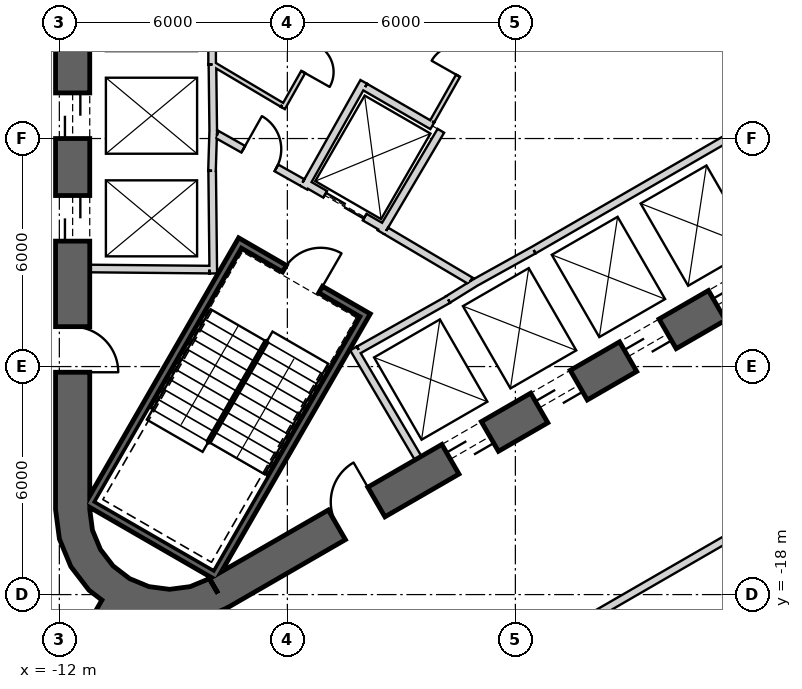
"""IFC4 building model, lengths in metres.
Left out: names, types, materials, properties, quantities, classifications, styles, units other than length and angle.
Written with IfcOpenShell. Run it as: python <this file> out.ifc"""

import sys

from ifc_helpers import new_model, si_unit, direction, frame, frame_2d, origin, place, context, subcontext, project, spatial, polyline, rectangle, outline, extrude, element, fill, save


model = new_model("IFC4")
c1 = context("Model", 3, precision=1e-05, world=origin(), true_north=direction((0.0, 1.0)))
c2 = subcontext(c1, "Body", "Model", "MODEL_VIEW")
j1 = project(units=[si_unit("LENGTHUNIT", "METRE"), si_unit("PLANEANGLEUNIT", "RADIAN")], contexts=[c1])
p1 = place(None, origin())
s1 = spatial("IfcSite", under=j1, at=p1, CompositionType="ELEMENT")
p2 = place(p1, origin())
s2 = spatial("IfcBuilding", under=s1, at=p2, CompositionType="ELEMENT")
p3 = place(p2, frame((0.0, 0.0, 193.2)))
s3 = spatial("IfcBuildingStorey", under=s2, at=p3, CompositionType="ELEMENT", Elevation=193.2)
p4 = place(p3, frame((-11.65, 15.762, 0.0), z_axis=(0.0, 0.0, 1.0), x_axis=(0.0, -1.0, 0.0)))
e1 = element("IfcWall", 1, at=p4, inside=s3, PredefinedType="SHEAR", context=c2, shape_type="SweptSolid", body=[
    extrude(rectangle(XDim=31.523, YDim=0.9, at=frame_2d((15.762, 0.0))), origin(), (0.0, 0.0, 1.0), 4.0),
])
p5 = place(p4, frame((7.062, 0.0, 0.0)))
e2 = element("IfcOpeningElement", 2, at=p5, cuts=e1, PredefinedType="OPENING", context=c2, shape_type="SweptSolid", body=[
    extrude(rectangle(XDim=1.2, YDim=2.4, at=frame_2d((0.6, 1.2))), frame((0.0, 0.46, 0.0), z_axis=(0.0, -1.0, 0.0), x_axis=(1.0, 0.0, 0.0)), (0.0, 0.0, 1.0), 0.92),
])
p6 = place(p4, frame((9.762, 0.0, 0.0)))
e3 = element("IfcOpeningElement", 3, at=p6, cuts=e1, PredefinedType="OPENING", context=c2, shape_type="SweptSolid", body=[
    extrude(rectangle(XDim=1.2, YDim=2.4, at=frame_2d((0.6, 1.2))), frame((0.0, 0.46, 0.0), z_axis=(0.0, -1.0, 0.0), x_axis=(1.0, 0.0, 0.0)), (0.0, 0.0, 1.0), 0.92),
])
p7 = place(p4, frame((12.462, 0.0, 0.0)))
e4 = element("IfcOpeningElement", 4, at=p7, cuts=e1, PredefinedType="OPENING", context=c2, shape_type="SweptSolid", body=[
    extrude(rectangle(XDim=1.2, YDim=2.4, at=frame_2d((0.6, 1.2))), frame((0.0, 0.46, 0.0), z_axis=(0.0, -1.0, 0.0), x_axis=(1.0, 0.0, 0.0)), (0.0, 0.0, 1.0), 0.92),
])
p8 = place(p4, frame((15.162, 0.0, 0.0)))
e5 = element("IfcOpeningElement", 5, at=p8, cuts=e1, PredefinedType="OPENING", context=c2, shape_type="SweptSolid", body=[
    extrude(rectangle(XDim=1.2, YDim=2.4, at=frame_2d((0.6, 1.2))), frame((0.0, 0.46, 0.0), z_axis=(0.0, -1.0, 0.0), x_axis=(1.0, 0.0, 0.0)), (0.0, 0.0, 1.0), 0.92),
])
p9 = place(p4, frame((17.862, 0.0, 0.0)))
e6 = element("IfcOpeningElement", 6, at=p9, cuts=e1, PredefinedType="OPENING", context=c2, shape_type="SweptSolid", body=[
    extrude(rectangle(XDim=1.2, YDim=2.4, at=frame_2d((0.6, 1.2))), frame((0.0, 0.46, 0.0), z_axis=(0.0, -1.0, 0.0), x_axis=(1.0, 0.0, 0.0)), (0.0, 0.0, 1.0), 0.92),
])
p10 = place(p4, frame((20.562, 0.0, 0.0)))
e7 = element("IfcOpeningElement", 7, at=p10, cuts=e1, PredefinedType="OPENING", context=c2, shape_type="SweptSolid", body=[
    extrude(rectangle(XDim=1.2, YDim=2.4, at=frame_2d((0.6, 1.2))), frame((0.0, 0.46, 0.0), z_axis=(0.0, -1.0, 0.0), x_axis=(1.0, 0.0, 0.0)), (0.0, 0.0, 1.0), 0.92),
])
p11 = place(p4, frame((23.262, 0.0, 0.0)))
e8 = element("IfcOpeningElement", 8, at=p11, cuts=e1, PredefinedType="OPENING", context=c2, shape_type="SweptSolid", body=[
    extrude(rectangle(XDim=1.2, YDim=2.4, at=frame_2d((0.6, 1.2))), frame((0.0, 0.46, 0.0), z_axis=(0.0, -1.0, 0.0), x_axis=(1.0, 0.0, 0.0)), (0.0, 0.0, 1.0), 0.92),
])
p12 = place(p4, frame((3.612, 0.0, 0.0)))
e9 = element("IfcOpeningElement", 9, at=p12, cuts=e1, PredefinedType="OPENING", context=c2, shape_type="SweptSolid", body=[
    extrude(rectangle(XDim=1.2, YDim=2.4, at=frame_2d((0.6, 1.2))), frame((0.0, 0.46, 0.0), z_axis=(0.0, -1.0, 0.0), x_axis=(1.0, 0.0, 0.0)), (0.0, 0.0, 1.0), 0.92),
])
p13 = place(p4, frame((26.712, 0.0, 0.0)))
e10 = element("IfcOpeningElement", 10, at=p13, cuts=e1, PredefinedType="OPENING", context=c2, shape_type="SweptSolid", body=[
    extrude(rectangle(XDim=1.2, YDim=2.4, at=frame_2d((0.6, 1.2))), frame((0.0, 0.46, 0.0), z_axis=(0.0, -1.0, 0.0), x_axis=(1.0, 0.0, 0.0)), (0.0, 0.0, 1.0), 0.92),
])
p14 = place(p3, frame((-7.825, -17.97, 0.0), z_axis=(0.0, 0.0, 1.0), x_axis=(0.866028369851, 0.499994862586, 0.0)))
e11 = element("IfcWall", 11, at=p14, inside=s3, PredefinedType="SHEAR", context=c2, shape_type="SweptSolid", body=[
    extrude(rectangle(XDim=31.523, YDim=0.9, at=frame_2d((15.762, 0.0))), origin(), (0.0, 0.0, 1.0), 4.0),
])
p15 = place(p14, frame((7.062, 0.0, 0.0)))
e12 = element("IfcOpeningElement", 12, at=p15, cuts=e11, PredefinedType="OPENING", context=c2, shape_type="SweptSolid", body=[
    extrude(rectangle(XDim=1.2, YDim=2.4, at=frame_2d((0.6, 1.2))), frame((0.0, 0.46, 0.0), z_axis=(0.0, -1.0, 0.0), x_axis=(1.0, 0.0, 0.0)), (0.0, 0.0, 1.0), 0.92),
])
p16 = place(p14, frame((9.762, 0.0, 0.0)))
e13 = element("IfcOpeningElement", 13, at=p16, cuts=e11, PredefinedType="OPENING", context=c2, shape_type="SweptSolid", body=[
    extrude(rectangle(XDim=1.2, YDim=2.4, at=frame_2d((0.6, 1.2))), frame((0.0, 0.46, 0.0), z_axis=(0.0, -1.0, 0.0), x_axis=(1.0, 0.0, 0.0)), (0.0, 0.0, 1.0), 0.92),
])
p17 = place(p14, frame((12.462, 0.0, 0.0)))
e14 = element("IfcOpeningElement", 14, at=p17, cuts=e11, PredefinedType="OPENING", context=c2, shape_type="SweptSolid", body=[
    extrude(rectangle(XDim=1.2, YDim=2.4, at=frame_2d((0.6, 1.2))), frame((0.0, 0.46, 0.0), z_axis=(0.0, -1.0, 0.0), x_axis=(1.0, 0.0, 0.0)), (0.0, 0.0, 1.0), 0.92),
])
p18 = place(p14, frame((15.162, 0.0, 0.0)))
e15 = element("IfcOpeningElement", 15, at=p18, cuts=e11, PredefinedType="OPENING", context=c2, shape_type="SweptSolid", body=[
    extrude(rectangle(XDim=1.2, YDim=2.4, at=frame_2d((0.6, 1.2))), frame((0.0, 0.46, 0.0), z_axis=(0.0, -1.0, 0.0), x_axis=(1.0, 0.0, 0.0)), (0.0, 0.0, 1.0), 0.92),
])
p19 = place(p14, frame((17.862, 0.0, 0.0)))
e16 = element("IfcOpeningElement", 16, at=p19, cuts=e11, PredefinedType="OPENING", context=c2, shape_type="SweptSolid", body=[
    extrude(rectangle(XDim=1.2, YDim=2.4, at=frame_2d((0.6, 1.2))), frame((0.0, 0.46, 0.0), z_axis=(0.0, -1.0, 0.0), x_axis=(1.0, 0.0, 0.0)), (0.0, 0.0, 1.0), 0.92),
])
p20 = place(p14, frame((20.562, 0.0, 0.0)))
e17 = element("IfcOpeningElement", 17, at=p20, cuts=e11, PredefinedType="OPENING", context=c2, shape_type="SweptSolid", body=[
    extrude(rectangle(XDim=1.2, YDim=2.4, at=frame_2d((0.6, 1.2))), frame((0.0, 0.46, 0.0), z_axis=(0.0, -1.0, 0.0), x_axis=(1.0, 0.0, 0.0)), (0.0, 0.0, 1.0), 0.92),
])
p21 = place(p14, frame((26.712, 0.0, 0.0)))
e18 = element("IfcOpeningElement", 18, at=p21, cuts=e11, PredefinedType="OPENING", context=c2, shape_type="SweptSolid", body=[
    extrude(rectangle(XDim=1.2, YDim=2.4, at=frame_2d((0.6, 1.2))), frame((0.0, 0.46, 0.0), z_axis=(0.0, -1.0, 0.0), x_axis=(1.0, 0.0, 0.0)), (0.0, 0.0, 1.0), 0.92),
])
p22 = place(p14, frame((3.612, 0.0, 0.0)))
e19 = element("IfcOpeningElement", 19, at=p22, cuts=e11, PredefinedType="OPENING", context=c2, shape_type="SweptSolid", body=[
    extrude(rectangle(XDim=1.2, YDim=2.4, at=frame_2d((0.6, 1.2))), frame((0.0, 0.46, 0.0), z_axis=(0.0, -1.0, 0.0), x_axis=(1.0, 0.0, 0.0)), (0.0, 0.0, 1.0), 0.92),
])
p23 = place(p3, origin())
e20 = element("IfcWall", 20, at=p23, inside=s3, PredefinedType="SHEAR", context=c2, shape_type="SweptSolid", body=[
    extrude(outline(polyline([(-12.1, -15.762), (-11.998, -16.538), (-11.698, -17.262), (-11.221, -17.883), (-10.6, -18.36), (-9.876, -18.659), (-9.1, -18.762), (-8.323, -18.659), (-7.6, -18.36), (-8.05, -17.58), (-8.556, -17.79), (-9.1, -17.862), (-9.644, -17.79), (-10.15, -17.58), (-10.585, -17.247), (-10.919, -16.812), (-11.128, -16.305), (-11.2, -15.762), (-12.1, -15.762)])), origin(), (0.0, 0.0, 1.0), 4.0),
])
p24 = place(p3, frame((-10.575, -18.316, 0.0), z_axis=(0.0, 0.0, 1.0), x_axis=(-0.500001138955, -0.866024746207, 0.0)))
e21 = element("IfcWall", 21, at=p24, inside=s3, PredefinedType="SHEAR", context=c2, shape_type="SweptSolid", body=[
    extrude(rectangle(XDim=12.007, YDim=0.7, at=frame_2d((6.003, 0.0))), origin(), (0.0, 0.0, 1.0), 4.0),
])
p25 = place(p3, frame((-7.98, 4.05, 0.0), z_axis=(0.0, 0.0, 1.0), x_axis=(0.0, -1.0, 0.0)))
e22 = element("IfcWall", 22, at=p25, inside=s3, PredefinedType="PLUMBINGWALL", context=c2, shape_type="SweptSolid", body=[
    extrude(rectangle(XDim=8.1, YDim=0.2, at=frame_2d((4.05, 0.0))), origin(), (0.0, 0.0, 1.0), 3.7),
])
p26 = place(p3, frame((-7.95, -5.772, 0.0), z_axis=(0.0, 0.0, 1.0), x_axis=(-0.030803413295, -0.999525462272, 0.0)))
e23 = element("IfcWall", 23, at=p26, inside=s3, PredefinedType="PLUMBINGWALL", context=c2, shape_type="SweptSolid", body=[
    extrude(rectangle(XDim=1.078, YDim=0.2, at=frame_2d((0.539, 0.0))), origin(), (0.0, 0.0, 1.0), 3.7),
])
p27 = place(p3, frame((-7.971, -4.05, 0.0), z_axis=(0.0, 0.0, 1.0), x_axis=(0.012042535896, -0.999927486035, 0.0)))
e24 = element("IfcWall", 24, at=p27, inside=s3, PredefinedType="PLUMBINGWALL", context=c2, shape_type="SweptSolid", body=[
    extrude(rectangle(XDim=1.845, YDim=0.2, at=frame_2d((0.922, 0.0))), origin(), (0.0, 0.0, 1.0), 3.7),
])
p28 = place(p3, frame((-7.979, -6.85, 0.0), z_axis=(0.0, 0.0, 1.0), x_axis=(0.011121475088, -0.999938154483, 0.0)))
e25 = element("IfcWall", 25, at=p28, inside=s3, PredefinedType="PLUMBINGWALL", context=c2, shape_type="SweptSolid", body=[
    extrude(rectangle(XDim=2.7, YDim=0.2, at=frame_2d((1.35, 0.0))), origin(), (0.0, 0.0, 1.0), 3.7),
])
p29 = place(p3, frame((-8.05, -9.449, 0.0), z_axis=(0.0, 0.0, 1.0), x_axis=(-0.999957467379, 0.009222983926, 0.0)))
e26 = element("IfcWall", 26, at=p29, inside=s3, PredefinedType="PLUMBINGWALL", context=c2, shape_type="SweptSolid", body=[
    extrude(rectangle(XDim=3.15, YDim=0.2, at=frame_2d((1.575, 0.0))), origin(), (0.0, 0.0, 1.0), 3.7),
])
p30 = place(p3, frame((0.483, -8.936, 0.0), z_axis=(0.0, 0.0, 1.0), x_axis=(0.866030989016, 0.499990325971, 0.0)))
e27 = element("IfcWall", 27, at=p30, inside=s3, PredefinedType="PLUMBINGWALL", context=c2, shape_type="SweptSolid", body=[
    extrude(rectangle(XDim=8.1, YDim=0.2, at=frame_2d((4.05, 0.0))), origin(), (0.0, 0.0, 1.0), 3.7),
])
p31 = place(p3, frame((-2.558, -14.409, 0.0), z_axis=(0.0, 0.0, 1.0), x_axis=(-0.507997497166, 0.861358544901, 0.0)))
e28 = element("IfcWall", 28, at=p31, inside=s3, PredefinedType="PLUMBINGWALL", context=c2, shape_type="SweptSolid", body=[
    extrude(rectangle(XDim=3.35, YDim=0.2, at=frame_2d((1.675, 0.0))), origin(), (0.0, 0.0, 1.0), 3.7),
])
p32 = place(p3, frame((-1.769, -10.237, 0.0), z_axis=(0.0, 0.0, 1.0), x_axis=(-0.871534483978, -0.490334215854, 0.0)))
e29 = element("IfcWall", 29, at=p32, inside=s3, PredefinedType="PLUMBINGWALL", context=c2, shape_type="SweptSolid", body=[
    extrude(rectangle(XDim=2.7, YDim=0.2, at=frame_2d((1.35, 0.0))), origin(), (0.0, 0.0, 1.0), 3.7),
])
p33 = place(p3, frame((-1.024, -9.771, 0.0), z_axis=(0.0, 0.0, 1.0), x_axis=(-0.850348075135, -0.526220629693, 0.0)))
e30 = element("IfcWall", 30, at=p33, inside=s3, PredefinedType="PLUMBINGWALL", context=c2, shape_type="SweptSolid", body=[
    extrude(rectangle(XDim=0.878, YDim=0.2, at=frame_2d((0.439, 0.0))), origin(), (0.0, 0.0, 1.0), 3.7),
])
p34 = place(p3, frame((-1.13, -9.831, 0.0), z_axis=(0.0, 0.0, 1.0), x_axis=(0.874269620932, 0.485440655401, 0.0)))
e31 = element("IfcWall", 31, at=p34, inside=s3, PredefinedType="PLUMBINGWALL", context=c2, shape_type="SweptSolid", body=[
    extrude(rectangle(XDim=1.845, YDim=0.2, at=frame_2d((0.922, 0.0))), origin(), (0.0, 0.0, 1.0), 3.7),
])
p35 = place(p3, frame((-3.905, -10.563, -0.3), z_axis=(0.0, 0.0, 1.0), x_axis=(-0.500012932018, -0.866017937352, 0.0)))
e32 = element("IfcWall", 32, at=p35, inside=s3, PredefinedType="SHEAR", context=c2, shape_type="SweptSolid", body=[
    extrude(rectangle(XDim=8.1, YDim=0.2, at=frame_2d((4.05, 0.0))), origin(), (0.0, 0.0, 1.0), 4.0),
])
p36 = place(p3, frame((-11.282, -15.541, -0.3), z_axis=(0.0, 0.0, 1.0), x_axis=(0.866000483506, -0.500043160704, 0.0)))
e33 = element("IfcWall", 33, at=p36, inside=s3, PredefinedType="SHEAR", context=c2, shape_type="SweptSolid", body=[
    extrude(rectangle(XDim=3.8, YDim=0.2, at=frame_2d((1.9, 0.0))), origin(), (0.0, 0.0, 1.0), 4.0),
])
p37 = place(p3, frame((-7.196, -8.663, -0.3), z_axis=(0.0, 0.0, 1.0), x_axis=(-0.499997992926, -0.866026562566, 0.0)))
e34 = element("IfcWall", 34, at=p37, inside=s3, PredefinedType="SHEAR", context=c2, shape_type="SweptSolid", body=[
    extrude(rectangle(XDim=7.9, YDim=0.2, at=frame_2d((3.95, 0.0))), origin(), (0.0, 0.0, 1.0), 4.0),
])
p38 = place(p3, frame((-4.041, -10.599, -0.3), z_axis=(0.0, 0.0, 1.0), x_axis=(-0.866047807691, 0.499961193289, 0.0)))
e35 = element("IfcWall", 35, at=p38, inside=s3, PredefinedType="SHEAR", context=c2, shape_type="SweptSolid", body=[
    extrude(rectangle(XDim=3.6, YDim=0.2, at=frame_2d((1.8, 0.0))), origin(), (0.0, 0.0, 1.0), 4.0),
])
p39 = place(p38, frame((1.25, 0.0, 0.3)))
e36 = element("IfcOpeningElement", 36, at=p39, cuts=e35, PredefinedType="OPENING", context=c2, shape_type="SweptSolid", body=[
    extrude(rectangle(XDim=1.1, YDim=2.1, at=frame_2d((0.55, 1.05))), frame((0.0, 0.11, 0.0), z_axis=(0.0, -1.0, 0.0), x_axis=(1.0, 0.0, 0.0)), (0.0, 0.0, 1.0), 0.22),
])
p40 = place(p3, frame((-3.446, -8.368, 0.0), z_axis=(0.0, 0.0, 1.0), x_axis=(-0.866024647952, 0.500001309137, 0.0)))
e37 = element("IfcWall", 37, at=p40, inside=s3, PredefinedType="PLUMBINGWALL", context=c2, shape_type="SweptSolid", body=[
    extrude(rectangle(XDim=2.4, YDim=0.2, at=frame_2d((1.2, 0.0))), origin(), (0.0, 0.0, 1.0), 3.7),
])
p41 = place(p40, frame((0.6, 0.0, 0.0)))
e38 = element("IfcOpeningElement", 38, at=p41, cuts=e37, PredefinedType="OPENING", context=c2, shape_type="SweptSolid", body=[
    extrude(rectangle(XDim=1.2, YDim=2.4, at=frame_2d((0.6, 1.2))), frame((0.0, 0.11, 0.0), z_axis=(0.0, -1.0, 0.0), x_axis=(1.0, 0.0, 0.0)), (0.0, 0.0, 1.0), 0.22),
])
p42 = place(p3, frame((-1.961, -5.796, 0.0), z_axis=(0.0, 0.0, 1.0), x_axis=(-0.508647062354, -0.860975125052, 0.0)))
e39 = element("IfcWall", 39, at=p42, inside=s3, PredefinedType="PLUMBINGWALL", context=c2, shape_type="SweptSolid", body=[
    extrude(rectangle(XDim=3.1, YDim=0.2, at=frame_2d((1.55, 0.0))), origin(), (0.0, 0.0, 1.0), 3.7),
])
p43 = place(p3, frame((-3.99, -4.509, 0.0), z_axis=(0.0, 0.0, 1.0), x_axis=(-0.491358283181, -0.870957540612, 0.0)))
e40 = element("IfcWall", 40, at=p43, inside=s3, PredefinedType="PLUMBINGWALL", context=c2, shape_type="SweptSolid", body=[
    extrude(rectangle(XDim=3.2, YDim=0.2, at=frame_2d((1.6, 0.0))), origin(), (0.0, 0.0, 1.0), 3.7),
])
p44 = place(p3, frame((-3.953, -4.646, 0.0), z_axis=(0.0, 0.0, 1.0), x_axis=(0.866032100247, -0.499988401207, 0.0)))
e41 = element("IfcWall", 41, at=p44, inside=s3, PredefinedType="PLUMBINGWALL", context=c2, shape_type="SweptSolid", body=[
    extrude(rectangle(XDim=2.04, YDim=0.2, at=frame_2d((1.02, 0.0))), origin(), (0.0, 0.0, 1.0), 3.7),
])
p45 = place(p3, frame((-3.401, -8.43, 0.0), z_axis=(0.0, 0.0, 1.0), x_axis=(0.860615607571, -0.509255118781, 0.0)))
e42 = element("IfcWall", 42, at=p45, inside=s3, PredefinedType="PARTITIONING", context=c2, shape_type="SweptSolid", body=[
    extrude(rectangle(XDim=2.581, YDim=0.2, at=frame_2d((1.29, 0.0))), origin(), (0.0, 0.0, 1.0), 3.7),
])
p46 = place(p3, frame((-7.849, -5.894, 0.0), z_axis=(0.0, 0.0, 1.0), x_axis=(0.871363259478, -0.490638431059, 0.0)))
e43 = element("IfcWall", 43, at=p46, inside=s3, PredefinedType="PARTITIONING", context=c2, shape_type="SweptSolid", body=[
    extrude(rectangle(XDim=2.581, YDim=0.2, at=frame_2d((1.291, 0.0))), origin(), (0.0, 0.0, 1.0), 3.7),
])
p47 = place(p46, frame((0.791, 0.0, 0.0)))
e44 = element("IfcOpeningElement", 44, at=p47, cuts=e43, PredefinedType="OPENING", context=c2, shape_type="SweptSolid", body=[
    extrude(rectangle(XDim=1.0, YDim=2.1, at=frame_2d((0.5, 1.05))), frame((0.0, 0.11, 0.0), z_axis=(0.0, -1.0, 0.0), x_axis=(1.0, 0.0, 0.0)), (0.0, 0.0, 1.0), 0.22),
])
p48 = place(p3, frame((-0.383, -2.361, 0.0), z_axis=(0.0, 0.0, 1.0), x_axis=(-0.492992395315, -0.870033618983, 0.0)))
e45 = element("IfcWall", 45, at=p48, inside=s3, PredefinedType="PARTITIONING", context=c2, shape_type="SweptSolid", body=[
    extrude(rectangle(XDim=3.664, YDim=0.12, at=frame_2d((1.832, 0.0))), origin(), (0.0, 0.0, 1.0), 3.7),
])
p49 = place(p48, frame((1.483, 0.0, 0.0)))
e46 = element("IfcOpeningElement", 46, at=p49, cuts=e45, PredefinedType="OPENING", context=c2, shape_type="SweptSolid", body=[
    extrude(rectangle(XDim=0.8, YDim=2.1, at=frame_2d((0.4, 1.05))), frame((0.0, 0.07, 0.0), z_axis=(0.0, -1.0, 0.0), x_axis=(1.0, 0.0, 0.0)), (0.0, 0.0, 1.0), 0.14),
])
p50 = place(p3, frame((-6.118, -5.198, 0.0), z_axis=(0.0, 0.0, 1.0), x_axis=(0.491036167924, 0.871139186233, 0.0)))
e47 = element("IfcWall", 47, at=p50, inside=s3, PredefinedType="PARTITIONING", context=c2, shape_type="SweptSolid", body=[
    extrude(rectangle(XDim=2.916, YDim=0.12, at=frame_2d((1.458, 0.0))), origin(), (0.0, 0.0, 1.0), 3.7),
])
p51 = place(p50, frame((1.088, 0.0, 0.0)))
e48 = element("IfcOpeningElement", 48, at=p51, cuts=e47, PredefinedType="OPENING", context=c2, shape_type="SweptSolid", body=[
    extrude(rectangle(XDim=0.8, YDim=2.1, at=frame_2d((0.4, 1.05))), frame((0.0, 0.07, 0.0), z_axis=(0.0, -1.0, 0.0), x_axis=(1.0, 0.0, 0.0)), (0.0, 0.0, 1.0), 0.14),
])
p52 = place(p3, frame((-7.95, -4.041, 0.0), z_axis=(0.0, 0.0, 1.0), x_axis=(0.860112457103, -0.510104461004, 0.0)))
e49 = element("IfcWall", 49, at=p52, inside=s3, PredefinedType="PARTITIONING", context=c2, shape_type="SweptSolid", body=[
    extrude(rectangle(XDim=2.104, YDim=0.12, at=frame_2d((1.052, 0.0))), origin(), (0.0, 0.0, 1.0), 3.7),
])
p53 = place(p3, frame((-1.727, -20.743, 0.0), z_axis=(0.0, 0.0, 1.0), x_axis=(0.866022578741, 0.500004893086, 0.0)))
e50 = element("IfcWall", 50, at=p53, inside=s3, PredefinedType="PARTITIONING", context=c2, shape_type="SweptSolid", body=[
    extrude(rectangle(XDim=13.917, YDim=0.2, at=frame_2d((6.958, 0.0))), origin(), (0.0, 0.0, 1.0), 2.98),
])
p54 = place(p39, origin())
e51 = element("IfcDoor", 51, at=p54, inside=s3, OperationType="SINGLE_SWING_RIGHT", PredefinedType="USERDEFINED", context=c2, shape_type="SweptSolid", body=[
    extrude(rectangle(XDim=1.1, YDim=2.1, at=frame_2d((0.55, 1.05))), frame((0.0, 0.025, 0.0), z_axis=(0.0, -1.0, 0.0), x_axis=(1.0, 0.0, 0.0)), (0.0, 0.0, 1.0), 0.05),
])
fill(e36, e51)
p55 = place(p47, origin())
e52 = element("IfcDoor", 52, at=p55, inside=s3, OperationType="SINGLE_SWING_LEFT", PredefinedType="USERDEFINED", context=c2, shape_type="SweptSolid", body=[
    extrude(rectangle(XDim=1.0, YDim=2.1, at=frame_2d((0.5, 1.05))), frame((0.0, 0.025, 0.0), z_axis=(0.0, -1.0, 0.0), x_axis=(1.0, 0.0, 0.0)), (0.0, 0.0, 1.0), 0.05),
])
fill(e44, e52)
p56 = place(p41, origin())
e53 = element("IfcDoor", 53, at=p56, inside=s3, OperationType="SLIDING_TO_LEFT", PredefinedType="USERDEFINED", context=c2, shape_type="SweptSolid", body=[
    extrude(rectangle(XDim=1.2, YDim=2.4, at=frame_2d((0.6, 1.2))), frame((0.0, 0.025, 0.0), z_axis=(0.0, -1.0, 0.0), x_axis=(1.0, 0.0, 0.0)), (0.0, 0.0, 1.0), 0.05),
])
fill(e38, e53)
p57 = place(p49, origin())
e54 = element("IfcDoor", 54, at=p57, inside=s3, OperationType="SINGLE_SWING_RIGHT", PredefinedType="USERDEFINED", context=c2, shape_type="SweptSolid", body=[
    extrude(rectangle(XDim=0.8, YDim=2.1, at=frame_2d((0.4, 1.05))), frame((0.0, 0.025, 0.0), z_axis=(0.0, -1.0, 0.0), x_axis=(1.0, 0.0, 0.0)), (0.0, 0.0, 1.0), 0.05),
])
fill(e46, e54)
p58 = place(p51, origin())
e55 = element("IfcDoor", 55, at=p58, inside=s3, OperationType="SINGLE_SWING_RIGHT", PredefinedType="USERDEFINED", context=c2, shape_type="SweptSolid", body=[
    extrude(rectangle(XDim=0.8, YDim=2.1, at=frame_2d((0.4, 1.05))), frame((0.0, 0.025, 0.0), z_axis=(0.0, -1.0, 0.0), x_axis=(1.0, 0.0, 0.0)), (0.0, 0.0, 1.0), 0.05),
])
fill(e48, e55)
p59 = place(p10, origin())
e56 = element("IfcDoor", 56, at=p59, inside=s3, OperationType="SLIDING_TO_LEFT", PredefinedType="USERDEFINED", context=c2, shape_type="SweptSolid", body=[
    extrude(rectangle(XDim=1.2, YDim=2.4, at=frame_2d((0.6, 1.2))), frame((0.0, 0.025, 0.0), z_axis=(0.0, -1.0, 0.0), x_axis=(1.0, 0.0, 0.0)), (0.0, 0.0, 1.0), 0.05),
])
fill(e7, e56)
p60 = place(p11, origin())
e57 = element("IfcDoor", 57, at=p60, inside=s3, OperationType="SLIDING_TO_LEFT", PredefinedType="USERDEFINED", context=c2, shape_type="SweptSolid", body=[
    extrude(rectangle(XDim=1.2, YDim=2.4, at=frame_2d((0.6, 1.2))), frame((0.0, 0.025, 0.0), z_axis=(0.0, -1.0, 0.0), x_axis=(1.0, 0.0, 0.0)), (0.0, 0.0, 1.0), 0.05),
])
fill(e8, e57)
p61 = place(p15, origin())
e58 = element("IfcDoor", 58, at=p61, inside=s3, OperationType="SLIDING_TO_LEFT", PredefinedType="USERDEFINED", context=c2, shape_type="SweptSolid", body=[
    extrude(rectangle(XDim=1.2, YDim=2.4, at=frame_2d((0.6, 1.2))), frame((0.0, 0.025, 0.0), z_axis=(0.0, -1.0, 0.0), x_axis=(1.0, 0.0, 0.0)), (0.0, 0.0, 1.0), 0.05),
])
fill(e12, e58)
p62 = place(p16, origin())
e59 = element("IfcDoor", 59, at=p62, inside=s3, OperationType="SLIDING_TO_LEFT", PredefinedType="USERDEFINED", context=c2, shape_type="SweptSolid", body=[
    extrude(rectangle(XDim=1.2, YDim=2.4, at=frame_2d((0.6, 1.2))), frame((0.0, 0.025, 0.0), z_axis=(0.0, -1.0, 0.0), x_axis=(1.0, 0.0, 0.0)), (0.0, 0.0, 1.0), 0.05),
])
fill(e13, e59)
p63 = place(p17, origin())
e60 = element("IfcDoor", 60, at=p63, inside=s3, OperationType="SLIDING_TO_LEFT", PredefinedType="USERDEFINED", context=c2, shape_type="SweptSolid", body=[
    extrude(rectangle(XDim=1.2, YDim=2.4, at=frame_2d((0.6, 1.2))), frame((0.0, 0.025, 0.0), z_axis=(0.0, -1.0, 0.0), x_axis=(1.0, 0.0, 0.0)), (0.0, 0.0, 1.0), 0.05),
])
fill(e14, e60)
p64 = place(p18, origin())
e61 = element("IfcDoor", 61, at=p64, inside=s3, OperationType="SLIDING_TO_LEFT", PredefinedType="USERDEFINED", context=c2, shape_type="SweptSolid", body=[
    extrude(rectangle(XDim=1.2, YDim=2.4, at=frame_2d((0.6, 1.2))), frame((0.0, 0.025, 0.0), z_axis=(0.0, -1.0, 0.0), x_axis=(1.0, 0.0, 0.0)), (0.0, 0.0, 1.0), 0.05),
])
fill(e15, e61)
p65 = place(p13, origin())
e62 = element("IfcDoor", 62, at=p65, inside=s3, OperationType="SINGLE_SWING_RIGHT", PredefinedType="USERDEFINED", context=c2, shape_type="SweptSolid", body=[
    extrude(rectangle(XDim=1.2, YDim=2.4, at=frame_2d((0.6, 1.2))), frame((0.0, 0.025, 0.0), z_axis=(0.0, -1.0, 0.0), x_axis=(1.0, 0.0, 0.0)), (0.0, 0.0, 1.0), 0.05),
])
fill(e10, e62)
p66 = place(p22, origin())
e63 = element("IfcDoor", 63, at=p66, inside=s3, OperationType="SINGLE_SWING_LEFT", PredefinedType="USERDEFINED", context=c2, shape_type="SweptSolid", body=[
    extrude(rectangle(XDim=1.2, YDim=2.4, at=frame_2d((0.6, 1.2))), frame((0.0, 0.025, 0.0), z_axis=(0.0, -1.0, 0.0), x_axis=(1.0, 0.0, 0.0)), (0.0, 0.0, 1.0), 0.05),
])
fill(e19, e63)
save(model, sys.argv[1])
